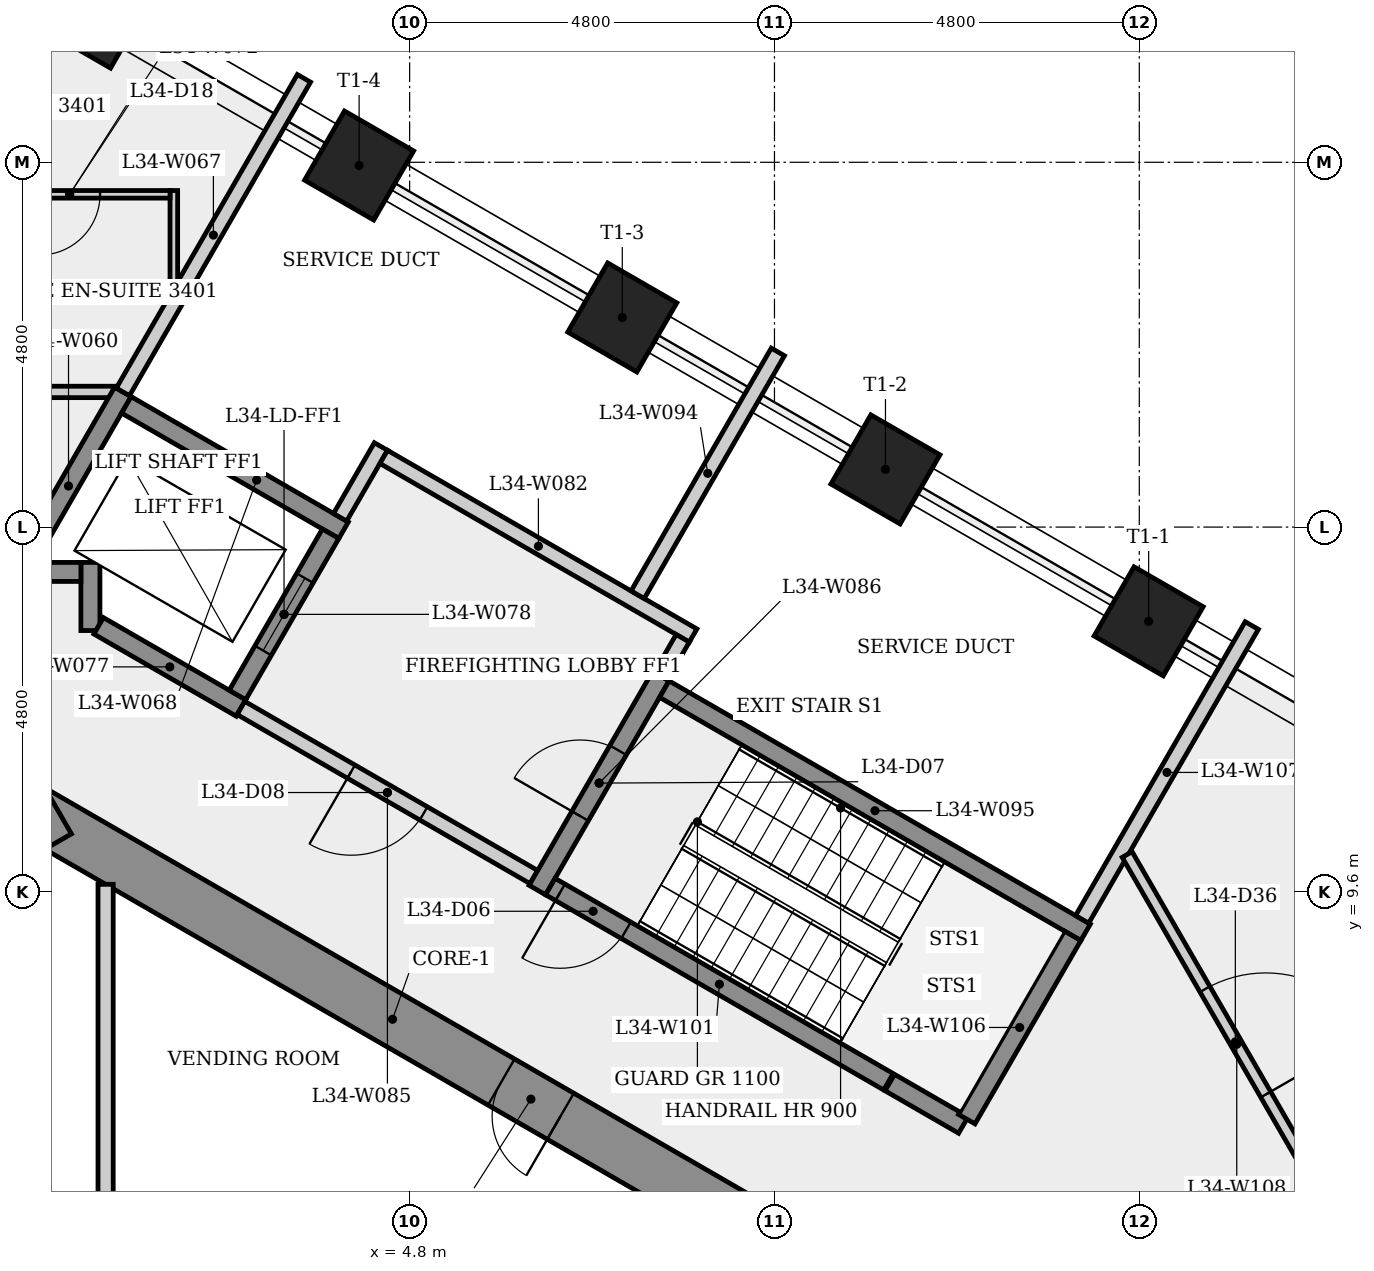
"""IFC4 building model, lengths in metres.
Left out: names, types, materials, properties, quantities, classifications, styles, units other than length and angle.
Written with IfcOpenShell. Run it as: python <this file> out.ifc"""

import sys

from ifc_helpers import new_model, si_unit, direction, frame, frame_2d, origin, origin_2d, place, context, subcontext, project, spatial, rectangle, extrude, element, fill, save


model = new_model("IFC4")
c1 = context("Model", 3, precision=1e-05, world=origin(), true_north=direction((0.0, 1.0)))
c2 = subcontext(c1, "Body", "Model", "MODEL_VIEW")
j1 = project(units=[si_unit("LENGTHUNIT", "METRE"), si_unit("PLANEANGLEUNIT", "RADIAN")], contexts=[c1])
p1 = place(None, origin())
s1 = spatial("IfcSite", under=j1, at=p1, CompositionType="ELEMENT")
p2 = place(p1, origin())
s2 = spatial("IfcBuilding", under=s1, at=p2, CompositionType="ELEMENT")
p3 = place(p2, frame((0.0, 0.0, 128.5)))
s3 = spatial("IfcBuildingStorey", under=s2, at=p3, CompositionType="ELEMENT", Elevation=128.5)
p4 = place(p3, frame((9.325, 5.182, 0.0), z_axis=(0.0, 0.0, 1.0), x_axis=(-0.866023993627, 0.500002442456, 0.0)))
e1 = element("IfcWall", 1, at=p4, inside=s3, PredefinedType="SHEAR", context=c2, shape_type="SweptSolid", body=[
    extrude(rectangle(XDim=10.97, YDim=0.7, at=frame_2d((5.485, 0.0))), origin(), (0.0, 0.0, 1.0), 4.0),
])
p5 = place(p4, frame((2.933, 0.0, 0.0)))
e2 = element("IfcOpeningElement", 2, at=p5, cuts=e1, PredefinedType="OPENING", context=c2, shape_type="SweptSolid", body=[
    extrude(rectangle(XDim=0.9, YDim=2.1, at=frame_2d((0.45, 1.05))), frame((0.0, 0.36, 0.0), z_axis=(0.0, -1.0, 0.0), x_axis=(1.0, 0.0, 0.0)), (0.0, 0.0, 1.0), 0.72),
])
p6 = place(p3, frame((0.175, 10.667, 0.0), z_axis=(0.0, 0.0, 1.0), x_axis=(-0.866023993627, -0.500002442456, 0.0)))
e3 = element("IfcWall", 3, at=p6, inside=s3, PredefinedType="SHEAR", context=c2, shape_type="SweptSolid", body=[
    extrude(rectangle(XDim=10.97, YDim=0.7, at=frame_2d((5.485, 0.0))), origin(), (0.0, 0.0, 1.0), 4.0),
])
p7 = place(p6, frame((9.254, 0.0, 0.0)))
e4 = element("IfcOpeningElement", 4, at=p7, cuts=e3, PredefinedType="OPENING", context=c2, shape_type="SweptSolid", body=[
    extrude(rectangle(XDim=0.9, YDim=2.1, at=frame_2d((0.45, 1.05))), frame((0.0, 0.36, 0.0), z_axis=(0.0, -1.0, 0.0), x_axis=(1.0, 0.0, 0.0)), (0.0, 0.0, 1.0), 0.72),
])
p8 = place(p6, frame((2.033, 0.0, 0.0)))
e5 = element("IfcOpeningElement", 5, at=p8, cuts=e3, PredefinedType="OPENING", context=c2, shape_type="SweptSolid", body=[
    extrude(rectangle(XDim=0.9, YDim=2.1, at=frame_2d((0.45, 1.05))), frame((0.0, 0.36, 0.0), z_axis=(0.0, -1.0, 0.0), x_axis=(1.0, 0.0, 0.0)), (0.0, 0.0, 1.0), 0.72),
])
for number, where, z_axis, x_axis in (
    (6, (14.523, 13.16, 0.0), (0.0, 0.0, 1.0), (0.5, 0.866, 0.0)),
    (7, (11.06, 15.159, 0.0), (0.0, 0.0, 1.0), (0.5, 0.866, 0.0)),
    (8, (7.598, 17.158, 0.0), (0.0, 0.0, 1.0), (0.5, 0.866, 0.0)),
    (9, (4.135, 19.157, 0.0), (0.0, 0.0, 1.0), (0.5, 0.866, 0.0)),
    (10, (0.673, 21.156, 0.0), (0.0, 0.0, 1.0), (0.5, 0.866, 0.0)),
):
    element("IfcColumn", number, at=place(p3, frame(where, z_axis=z_axis, x_axis=x_axis)), inside=s3, PredefinedType="COLUMN", context=c2, shape_type="SweptSolid", body=[
        extrude(rectangle(XDim=1.05, YDim=1.05, at=origin_2d()), origin(), (0.0, 0.0, 1.0), 4.0),
    ])
p9 = place(p3, frame((-3.455, 16.178, 0.0), z_axis=(0.0, 0.0, 1.0), x_axis=(1.0, 0.0, 0.0)))
e11 = element("IfcWall", 11, at=p9, inside=s3, PredefinedType="PARTITIONING", context=c2, shape_type="SweptSolid", body=[
    extrude(rectangle(XDim=4.382, YDim=0.15, at=frame_2d((2.191, 0.0))), origin(), (0.0, 0.0, 1.0), 3.65),
])
p10 = place(p9, frame((0.795, 0.0, 0.0)))
e12 = element("IfcOpeningElement", 12, at=p10, cuts=e11, PredefinedType="OPENING", context=c2, shape_type="SweptSolid", body=[
    extrude(rectangle(XDim=0.9, YDim=2.1, at=frame_2d((0.45, 1.05))), frame((0.0, 0.085, 0.0), z_axis=(0.0, -1.0, 0.0), x_axis=(1.0, 0.0, 0.0)), (0.0, 0.0, 1.0), 0.17),
])
p11 = place(p3, frame((-0.403, 13.702, 0.0), z_axis=(0.0, 0.0, 1.0), x_axis=(0.499976111731, 0.866039195244, 0.0)))
e13 = element("IfcWall", 13, at=p11, inside=s3, PredefinedType="SHEAR", context=c2, shape_type="SweptSolid", body=[
    extrude(rectangle(XDim=2.861, YDim=0.25, at=frame_2d((1.43, 0.0))), origin(), (0.0, 0.0, 1.0), 3.65),
])
p12 = place(p3, frame((0.6, 13.039, 0.0), z_axis=(0.0, 0.0, 1.0), x_axis=(0.0, 1.0, 0.0)))
e14 = element("IfcWall", 14, at=p12, inside=s3, PredefinedType="SHEAR", context=c2, shape_type="SweptSolid", body=[
    extrude(rectangle(XDim=0.896, YDim=0.25, at=frame_2d((0.448, 0.0))), origin(), (0.0, 0.0, 1.0), 3.65),
])
p13 = place(p3, frame((0.475, 13.81, 0.0), z_axis=(0.0, 0.0, 1.0), x_axis=(-1.0, 0.0, 0.0)))
e15 = element("IfcWall", 15, at=p13, inside=s3, PredefinedType="SHEAR", context=c2, shape_type="SweptSolid", body=[
    extrude(rectangle(XDim=0.691, YDim=0.25, at=frame_2d((0.345, 0.0))), origin(), (0.0, 0.0, 1.0), 4.0),
])
p14 = place(p3, frame((0.8, 9.699, 0.0), z_axis=(0.0, 0.0, 1.0), x_axis=(0.0, -1.0, 0.0)))
e16 = element("IfcWall", 16, at=p14, inside=s3, PredefinedType="PARTITIONING", context=c2, shape_type="SweptSolid", body=[
    extrude(rectangle(XDim=4.425, YDim=0.2, at=frame_2d((2.212, 0.0))), origin(), (0.0, 0.0, 1.0), 3.65),
])
p15 = place(p3, frame((1.027, 16.179, 0.0), z_axis=(0.0, 0.0, 1.0), x_axis=(0.499991561973, 0.866030275427, 0.0)))
e17 = element("IfcWall", 17, at=p15, inside=s3, PredefinedType="PLUMBINGWALL", context=c2, shape_type="SweptSolid", body=[
    extrude(rectangle(XDim=4.764, YDim=0.2, at=frame_2d((2.382, 0.0))), origin(), (0.0, 0.0, 1.0), 3.65),
])
p16 = place(p3, frame((1.073, 16.008, 0.0), z_axis=(0.0, 0.0, 1.0), x_axis=(0.866040211805, -0.499974350878, 0.0)))
e18 = element("IfcWall", 18, at=p16, inside=s3, PredefinedType="SHEAR", context=c2, shape_type="SweptSolid", body=[
    extrude(rectangle(XDim=3.3, YDim=0.25, at=frame_2d((1.65, 0.0))), origin(), (0.0, 0.0, 1.0), 3.65),
])
p17 = place(p3, frame((1.698, 17.44, 0.0), z_axis=(0.0, 0.0, 1.0), x_axis=(0.0, 1.0, 0.0)))
e19 = element("IfcWall", 19, at=p17, inside=s3, PredefinedType="PARTITIONING", context=c2, shape_type="SweptSolid", body=[
    extrude(rectangle(XDim=1.388, YDim=0.1, at=frame_2d((0.694, 0.0))), origin(), (0.0, 0.0, 1.0), 3.65),
])
p18 = place(p3, frame((1.648, 18.778, 0.0), z_axis=(0.0, 0.0, 1.0), x_axis=(-1.0, 0.0, 0.0)))
e20 = element("IfcWall", 20, at=p18, inside=s3, PredefinedType="PARTITIONING", context=c2, shape_type="SweptSolid", body=[
    extrude(rectangle(XDim=2.642, YDim=0.1, at=frame_2d((1.321, 0.0))), origin(), (0.0, 0.0, 1.0), 3.65),
])
p19 = place(p18, frame((0.921, 0.0, 0.0)))
e21 = element("IfcOpeningElement", 21, at=p19, cuts=e20, PredefinedType="OPENING", context=c2, shape_type="SweptSolid", body=[
    extrude(rectangle(XDim=0.8, YDim=2.1, at=frame_2d((0.4, 1.05))), frame((0.0, 0.06, 0.0), z_axis=(0.0, -1.0, 0.0), x_axis=(1.0, 0.0, 0.0)), (0.0, 0.0, 1.0), 0.12),
])
p20 = place(p3, frame((2.581, 12.02, 0.0), z_axis=(0.0, 0.0, 1.0), x_axis=(-0.86603892542, 0.499976579108, 0.0)))
e22 = element("IfcWall", 22, at=p20, inside=s3, PredefinedType="SHEAR", context=c2, shape_type="SweptSolid", body=[
    extrude(rectangle(XDim=2.162, YDim=0.25, at=frame_2d((1.081, 0.0))), origin(), (0.0, 0.0, 1.0), 3.65),
])
p21 = place(p3, frame((2.535, 12.191, 0.0), z_axis=(0.0, 0.0, 1.0), x_axis=(0.500061746146, 0.865989751695, 0.0)))
e23 = element("IfcWall", 23, at=p21, inside=s3, PredefinedType="SHEAR", context=c2, shape_type="SweptSolid", body=[
    extrude(rectangle(XDim=2.45, YDim=0.25, at=frame_2d((1.225, 0.0))), origin(), (0.0, 0.0, 1.0), 4.0),
])
p22 = place(p21, frame((0.675, 0.0, 0.0)))
e24 = element("IfcOpeningElement", 24, at=p22, cuts=e23, PredefinedType="OPENING", context=c2, shape_type="SweptSolid", body=[
    extrude(rectangle(XDim=1.1, YDim=2.1, at=frame_2d((0.55, 1.05))), frame((0.0, 0.135, 0.0), z_axis=(0.0, -1.0, 0.0), x_axis=(1.0, 0.0, 0.0)), (0.0, 0.0, 1.0), 0.27),
])
p23 = place(p3, frame((3.885, 14.529, 0.0), z_axis=(0.0, 0.0, 1.0), x_axis=(0.499997628298, 0.866026773083, 0.0)))
e25 = element("IfcWall", 25, at=p23, inside=s3, PredefinedType="PLUMBINGWALL", context=c2, shape_type="SweptSolid", body=[
    extrude(rectangle(XDim=1.075, YDim=0.2, at=frame_2d((0.538, 0.0))), origin(), (0.0, 0.0, 1.0), 3.65),
])
p24 = place(p3, frame((4.459, 15.323, 0.0), z_axis=(0.0, 0.0, 1.0), x_axis=(0.866016039709, -0.500016218704, 0.0)))
e26 = element("IfcWall", 26, at=p24, inside=s3, PredefinedType="PLUMBINGWALL", context=c2, shape_type="SweptSolid", body=[
    extrude(rectangle(XDim=4.7, YDim=0.2, at=frame_2d((2.35, 0.0))), origin(), (0.0, 0.0, 1.0), 3.65),
])
p25 = place(p3, frame((6.435, 9.795, 0.0), z_axis=(0.0, 0.0, 1.0), x_axis=(-0.866012907634, 0.500021643343, 0.0)))
e27 = element("IfcWall", 27, at=p25, inside=s3, PredefinedType="PARTITIONING", context=c2, shape_type="SweptSolid", body=[
    extrude(rectangle(XDim=4.45, YDim=0.2, at=frame_2d((2.225, 0.0))), origin(), (0.0, 0.0, 1.0), 3.65),
])
p26 = place(p25, frame((1.675, 0.0, 0.0)))
e28 = element("IfcOpeningElement", 28, at=p26, cuts=e27, PredefinedType="OPENING", context=c2, shape_type="SweptSolid", body=[
    extrude(rectangle(XDim=1.1, YDim=2.1, at=frame_2d((0.55, 1.05))), frame((0.0, 0.11, 0.0), z_axis=(0.0, -1.0, 0.0), x_axis=(1.0, 0.0, 0.0)), (0.0, 0.0, 1.0), 0.22),
])
p27 = place(p3, frame((6.48, 9.624, 0.0), z_axis=(0.0, 0.0, 1.0), x_axis=(0.500017246033, 0.866015446554, 0.0)))
e29 = element("IfcWall", 29, at=p27, inside=s3, PredefinedType="SHEAR", context=c2, shape_type="SweptSolid", body=[
    extrude(rectangle(XDim=3.25, YDim=0.25, at=frame_2d((1.625, 0.0))), origin(), (0.0, 0.0, 1.0), 3.65),
])
p28 = place(p27, frame((1.125, 0.0, 0.0)))
e30 = element("IfcOpeningElement", 30, at=p28, cuts=e29, PredefinedType="OPENING", context=c2, shape_type="SweptSolid", body=[
    extrude(rectangle(XDim=1.0, YDim=2.1, at=frame_2d((0.5, 1.05))), frame((0.0, 0.135, 0.0), z_axis=(0.0, -1.0, 0.0), x_axis=(1.0, 0.0, 0.0)), (0.0, 0.0, 1.0), 0.27),
])
p29 = place(p3, frame((7.8, 13.51, 0.0), z_axis=(0.0, 0.0, 1.0), x_axis=(0.499989793889, 0.866031296205, 0.0)))
e31 = element("IfcWall", 31, at=p29, inside=s3, PredefinedType="PLUMBINGWALL", context=c2, shape_type="SweptSolid", body=[
    extrude(rectangle(XDim=3.689, YDim=0.2, at=frame_2d((1.844, 0.0))), origin(), (0.0, 0.0, 1.0), 3.65),
])
p30 = place(p3, frame((8.151, 12.268, 0.0), z_axis=(0.0, 0.0, 1.0), x_axis=(0.866025499775, -0.499999833739, 0.0)))
e32 = element("IfcWall", 32, at=p30, inside=s3, PredefinedType="SHEAR", context=c2, shape_type="SweptSolid", body=[
    extrude(rectangle(XDim=6.4, YDim=0.25, at=frame_2d((3.2, 0.0))), origin(), (0.0, 0.0, 1.0), 3.65),
])
p31 = place(p3, frame((8.393, 12.937, 0.0), z_axis=(0.0, 0.0, 1.0), x_axis=(-0.500065409566, -0.86598763626, 0.0)))
e33 = element("IfcWall", 33, at=p31, inside=s3, PredefinedType="PLUMBINGWALL", context=c2, shape_type="SweptSolid", body=[
    extrude(rectangle(XDim=0.575, YDim=0.2, at=frame_2d((0.288, 0.0))), origin(), (0.0, 0.0, 1.0), 3.65),
])
p32 = place(p3, frame((11.1, 7.101, 0.0), z_axis=(0.0, 0.0, 1.0), x_axis=(-0.8660265141, 0.499998076872, 0.0)))
e34 = element("IfcWall", 34, at=p32, inside=s3, PredefinedType="SHEAR", context=c2, shape_type="SweptSolid", body=[
    extrude(rectangle(XDim=5.137, YDim=0.25, at=frame_2d((2.569, 0.0))), origin(), (0.0, 0.0, 1.0), 3.65),
])
p33 = place(p32, frame((3.987, 0.0, 0.0)))
e35 = element("IfcOpeningElement", 35, at=p33, cuts=e34, PredefinedType="OPENING", context=c2, shape_type="SweptSolid", body=[
    extrude(rectangle(XDim=1.0, YDim=2.1, at=frame_2d((0.5, 1.05))), frame((0.0, 0.135, 0.0), z_axis=(0.0, -1.0, 0.0), x_axis=(1.0, 0.0, 0.0)), (0.0, 0.0, 1.0), 0.27),
])
p34 = place(p3, frame((12.085, 6.532, 0.0), z_axis=(0.0, 0.0, 1.0), x_axis=(-0.86604373436, 0.499968249168, 0.0)))
e36 = element("IfcWall", 36, at=p34, inside=s3, PredefinedType="SHEAR", context=c2, shape_type="SweptSolid", body=[
    extrude(rectangle(XDim=1.118, YDim=0.25, at=frame_2d((0.559, 0.0))), origin(), (0.0, 0.0, 1.0), 3.65),
])
p35 = place(p3, frame((13.523, 9.022, 0.0), z_axis=(0.0, 0.0, 1.0), x_axis=(-0.500013277472, -0.866017737897, 0.0)))
e37 = element("IfcWall", 37, at=p35, inside=s3, PredefinedType="SHEAR", context=c2, shape_type="SweptSolid", body=[
    extrude(rectangle(XDim=2.786, YDim=0.25, at=frame_2d((1.393, 0.0))), origin(), (0.0, 0.0, 1.0), 3.65),
])
p36 = place(p3, frame((13.648, 9.239, 0.0), z_axis=(0.0, 0.0, 1.0), x_axis=(0.499962311098, 0.866047162388, 0.0)))
e38 = element("IfcWall", 38, at=p36, inside=s3, PredefinedType="PLUMBINGWALL", context=c2, shape_type="SweptSolid", body=[
    extrude(rectangle(XDim=4.464, YDim=0.2, at=frame_2d((2.232, 0.0))), origin(), (0.0, 0.0, 1.0), 3.65),
])
p37 = place(p3, frame((14.24, 10.092, 0.0), z_axis=(0.0, 0.0, 1.0), x_axis=(0.500013126474, -0.866017825079, 0.0)))
e39 = element("IfcWall", 39, at=p37, inside=s3, PredefinedType="PARTITIONING", context=c2, shape_type="SweptSolid", body=[
    extrude(rectangle(XDim=5.768, YDim=0.15, at=frame_2d((2.884, 0.0))), origin(), (0.0, 0.0, 1.0), 3.65),
])
p38 = place(p37, frame((2.046, 0.0, 0.0)))
e40 = element("IfcOpeningElement", 40, at=p38, cuts=e39, PredefinedType="OPENING", context=c2, shape_type="SweptSolid", body=[
    extrude(rectangle(XDim=1.6, YDim=2.1, at=frame_2d((0.8, 1.05))), frame((0.0, 0.085, 0.0), z_axis=(0.0, -1.0, 0.0), x_axis=(1.0, 0.0, 0.0)), (0.0, 0.0, 1.0), 0.17),
])
p39 = place(p33, origin())
e41 = element("IfcDoor", 41, at=p39, inside=s3, OperationType="SINGLE_SWING_RIGHT", PredefinedType="DOOR", context=c2, shape_type="SweptSolid", body=[
    extrude(rectangle(XDim=1.0, YDim=2.1, at=frame_2d((0.5, 1.05))), frame((0.0, 0.025, 0.0), z_axis=(0.0, -1.0, 0.0), x_axis=(1.0, 0.0, 0.0)), (0.0, 0.0, 1.0), 0.05),
])
fill(e35, e41)
p40 = place(p28, origin())
e42 = element("IfcDoor", 42, at=p40, inside=s3, OperationType="SINGLE_SWING_LEFT", PredefinedType="DOOR", context=c2, shape_type="SweptSolid", body=[
    extrude(rectangle(XDim=1.0, YDim=2.1, at=frame_2d((0.5, 1.05))), frame((0.0, 0.025, 0.0), z_axis=(0.0, -1.0, 0.0), x_axis=(1.0, 0.0, 0.0)), (0.0, 0.0, 1.0), 0.05),
])
fill(e30, e42)
p41 = place(p26, origin())
e43 = element("IfcDoor", 43, at=p41, inside=s3, OperationType="SINGLE_SWING_RIGHT", PredefinedType="DOOR", context=c2, shape_type="SweptSolid", body=[
    extrude(rectangle(XDim=1.1, YDim=2.1, at=frame_2d((0.55, 1.05))), frame((0.0, 0.025, 0.0), z_axis=(0.0, -1.0, 0.0), x_axis=(1.0, 0.0, 0.0)), (0.0, 0.0, 1.0), 0.05),
])
fill(e28, e43)
p42 = place(p22, origin())
e44 = element("IfcDoor", 44, at=p42, inside=s3, OperationType="SLIDING_TO_LEFT", PredefinedType="DOOR", context=c2, shape_type="SweptSolid", body=[
    extrude(rectangle(XDim=1.1, YDim=2.1, at=frame_2d((0.55, 1.05))), frame((0.0, 0.025, 0.0), z_axis=(0.0, -1.0, 0.0), x_axis=(1.0, 0.0, 0.0)), (0.0, 0.0, 1.0), 0.05),
])
fill(e24, e44)
p43 = place(p19, origin())
e45 = element("IfcDoor", 45, at=p43, inside=s3, OperationType="SINGLE_SWING_RIGHT", PredefinedType="DOOR", context=c2, shape_type="SweptSolid", body=[
    extrude(rectangle(XDim=0.8, YDim=2.1, at=frame_2d((0.4, 1.05))), frame((0.0, 0.025, 0.0), z_axis=(0.0, -1.0, 0.0), x_axis=(1.0, 0.0, 0.0)), (0.0, 0.0, 1.0), 0.05),
])
fill(e21, e45)
p44 = place(p38, origin())
e46 = element("IfcDoor", 46, at=p44, inside=s3, OperationType="SINGLE_SWING_RIGHT", PredefinedType="DOOR", context=c2, shape_type="SweptSolid", body=[
    extrude(rectangle(XDim=1.6, YDim=2.1, at=frame_2d((0.8, 1.05))), frame((0.0, 0.025, 0.0), z_axis=(0.0, -1.0, 0.0), x_axis=(1.0, 0.0, 0.0)), (0.0, 0.0, 1.0), 0.05),
])
fill(e40, e46)
p45 = place(p5, origin())
e47 = element("IfcDoor", 47, at=p45, inside=s3, OperationType="SINGLE_SWING_LEFT", PredefinedType="DOOR", context=c2, shape_type="SweptSolid", body=[
    extrude(rectangle(XDim=0.9, YDim=2.1, at=frame_2d((0.45, 1.05))), frame((0.0, 0.025, 0.0), z_axis=(0.0, -1.0, 0.0), x_axis=(1.0, 0.0, 0.0)), (0.0, 0.0, 1.0), 0.05),
])
fill(e2, e47)
save(model, sys.argv[1])
